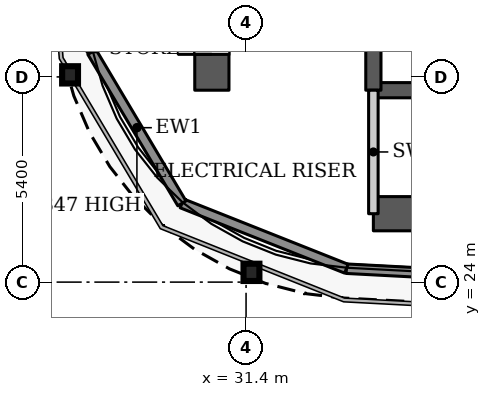
"""IFC4 building model, lengths in metres.
Left out: names, types, materials, properties, quantities, classifications, styles, units other than length and angle.
Written with IfcOpenShell. Run it as: python <this file> out.ifc"""

import sys

from ifc_helpers import new_model, si_unit, direction, frame, frame_2d, origin, origin_2d, place, context, subcontext, project, spatial, rectangle, i_section, extrude, source, transform, mapped, element, fill, save


model = new_model("IFC4")
c1 = context("Model", 3, precision=1e-05, world=origin(), true_north=direction((0.0, 1.0)))
c2 = subcontext(c1, "Body", "Model", "MODEL_VIEW")
j1 = project(units=[si_unit("LENGTHUNIT", "METRE"), si_unit("PLANEANGLEUNIT", "RADIAN")], contexts=[c1])
p1 = place(None, origin())
s1 = spatial("IfcSite", under=j1, at=p1, CompositionType="ELEMENT")
p2 = place(p1, origin())
s2 = spatial("IfcBuilding", under=s1, at=p2, CompositionType="ELEMENT")
p3 = place(p2, frame((0.0, 0.0, 89.0)))
s3 = spatial("IfcBuildingStorey", under=s2, at=p3, CompositionType="ELEMENT", Elevation=89.0)
for number, where, z_axis, x_axis in (
    (1, (31.542, 24.257, 0.0), (0.0, 0.0, 1.0), (1.0, 0.0, 0.0)),
    (2, (26.769, 29.454, 0.0), (0.0, 0.0, 1.0), (1.0, 0.0, 0.0)),
):
    element("IfcColumn", number, at=place(p3, frame(where, z_axis=z_axis, x_axis=x_axis)), inside=s3, PredefinedType="COLUMN", context=c2, shape_type="SweptSolid", body=[
        extrude(i_section(OverallWidth=0.418, OverallDepth=0.455, WebThickness=0.042, FlangeThickness=0.068, FilletRadius=0.014, at=origin_2d()), origin(), (0.0, 0.0, 1.0), 5.1),
    ])
p4 = place(p3, frame((34.75, 25.8, 0.0), z_axis=(0.0, 0.0, 1.0), x_axis=(1.0, 0.0, 0.0)))
e3 = element("IfcWall", 3, at=p4, inside=s3, PredefinedType="SHEAR", context=c2, shape_type="SweptSolid", body=[
    extrude(rectangle(XDim=18.4, YDim=0.9, at=frame_2d((9.2, 0.0))), origin(), (0.0, 0.0, 1.0), 5.1),
])
p5 = place(p3, frame((34.75, 29.05, 0.0), z_axis=(0.0, 0.0, 1.0), x_axis=(1.0, 0.0, 0.0)))
e4 = element("IfcWall", 4, at=p5, inside=s3, PredefinedType="SHEAR", context=c2, shape_type="SweptSolid", body=[
    extrude(rectangle(XDim=18.4, YDim=0.4, at=frame_2d((9.2, 0.0))), origin(), (0.0, 0.0, 1.0), 5.1),
])
p6 = place(p5, frame((15.125, 0.0, 0.0)))
e5 = element("IfcOpeningElement", 5, at=p6, cuts=e4, PredefinedType="OPENING", context=c2, shape_type="SweptSolid", body=[
    extrude(rectangle(XDim=1.1, YDim=2.2, at=frame_2d((0.55, 1.1))), frame((0.0, 0.21, 0.0), z_axis=(0.0, -1.0, 0.0), x_axis=(1.0, 0.0, 0.0)), (0.0, 0.0, 1.0), 0.42),
])
p7 = place(p3, frame((34.75, 29.05, 0.0), z_axis=(0.0, 0.0, 1.0), x_axis=(0.0, 1.0, 0.0)))
e6 = element("IfcWall", 6, at=p7, inside=s3, PredefinedType="SHEAR", context=c2, shape_type="SweptSolid", body=[
    extrude(rectangle(XDim=18.45, YDim=0.4, at=frame_2d((9.225, 0.0))), origin(), (0.0, 0.0, 1.0), 5.1),
])
p8 = place(p7, frame((8.025, 0.0, 0.0)))
e7 = element("IfcOpeningElement", 7, at=p8, cuts=e6, PredefinedType="OPENING", context=c2, shape_type="SweptSolid", body=[
    extrude(rectangle(XDim=1.1, YDim=2.2, at=frame_2d((0.55, 1.1))), frame((0.0, 0.21, 0.0), z_axis=(0.0, -1.0, 0.0), x_axis=(1.0, 0.0, 0.0)), (0.0, 0.0, 1.0), 0.42),
])
p9 = place(p7, frame((10.875, 0.0, 0.0)))
e8 = element("IfcOpeningElement", 8, at=p9, cuts=e6, PredefinedType="OPENING", context=c2, shape_type="SweptSolid", body=[
    extrude(rectangle(XDim=1.1, YDim=2.2, at=frame_2d((0.55, 1.1))), frame((0.0, 0.21, 0.0), z_axis=(0.0, -1.0, 0.0), x_axis=(1.0, 0.0, 0.0)), (0.0, 0.0, 1.0), 0.42),
])
p10 = place(p7, frame((13.725, 0.0, 0.0)))
e9 = element("IfcOpeningElement", 9, at=p10, cuts=e6, PredefinedType="OPENING", context=c2, shape_type="SweptSolid", body=[
    extrude(rectangle(XDim=1.1, YDim=2.2, at=frame_2d((0.55, 1.1))), frame((0.0, 0.21, 0.0), z_axis=(0.0, -1.0, 0.0), x_axis=(1.0, 0.0, 0.0)), (0.0, 0.0, 1.0), 0.42),
])
p11 = place(p7, frame((15.95, 0.0, 0.0)))
e10 = element("IfcOpeningElement", 10, at=p11, cuts=e6, PredefinedType="OPENING", context=c2, shape_type="SweptSolid", body=[
    extrude(rectangle(XDim=1.1, YDim=2.2, at=frame_2d((0.55, 1.1))), frame((0.0, 0.21, 0.0), z_axis=(0.0, -1.0, 0.0), x_axis=(1.0, 0.0, 0.0)), (0.0, 0.0, 1.0), 0.42),
])
p12 = place(p3, frame((30.5, 29.05, 0.0), z_axis=(0.0, 0.0, 1.0), x_axis=(0.0, 1.0, 0.0)))
e11 = element("IfcWall", 11, at=p12, inside=s3, PredefinedType="SHEAR", context=c2, shape_type="SweptSolid", body=[
    extrude(rectangle(XDim=18.45, YDim=0.9, at=frame_2d((9.225, 0.0))), origin(), (0.0, 0.0, 1.0), 5.1),
])
p13 = place(p12, frame((0.944, 0.0, 0.0)))
e12 = element("IfcOpeningElement", 12, at=p13, cuts=e11, PredefinedType="OPENING", context=c2, shape_type="SweptSolid", body=[
    extrude(rectangle(XDim=0.9, YDim=2.2, at=frame_2d((0.45, 1.1))), frame((0.0, 0.46, 0.0), z_axis=(0.0, -1.0, 0.0), x_axis=(1.0, 0.0, 0.0)), (0.0, 0.0, 1.0), 0.92),
])
p14 = place(p12, frame((6.975, 0.0, 0.0)))
e13 = element("IfcOpeningElement", 13, at=p14, cuts=e11, PredefinedType="OPENING", context=c2, shape_type="SweptSolid", body=[
    extrude(rectangle(XDim=0.9, YDim=2.2, at=frame_2d((0.45, 1.1))), frame((0.0, 0.46, 0.0), z_axis=(0.0, -1.0, 0.0), x_axis=(1.0, 0.0, 0.0)), (0.0, 0.0, 1.0), 0.92),
])
p15 = place(p12, frame((11.45, 0.0, 0.0)))
e14 = element("IfcOpeningElement", 14, at=p15, cuts=e11, PredefinedType="OPENING", context=c2, shape_type="SweptSolid", body=[
    extrude(rectangle(XDim=0.9, YDim=2.2, at=frame_2d((0.45, 1.1))), frame((0.0, 0.46, 0.0), z_axis=(0.0, -1.0, 0.0), x_axis=(1.0, 0.0, 0.0)), (0.0, 0.0, 1.0), 0.92),
])
p16 = place(p3, frame((100.625, 20.848, 0.0), z_axis=(0.0, 0.0, 1.0), x_axis=(-0.998617353906, 0.052567865445, 0.0)))
e15 = element("IfcWall", 15, at=p16, inside=s3, PredefinedType="SOLIDWALL", context=c2, shape_type="SweptSolid", body=[
    extrude(rectangle(XDim=66.678, YDim=0.25, at=frame_2d((33.339, 0.0))), origin(), (0.0, 0.0, 1.0), 4.95),
])
p17 = place(p3, frame((34.039, 24.353, 0.0), z_axis=(0.0, 0.0, 1.0), x_axis=(-0.929352825399, 0.369192803184, 0.0)))
e16 = element("IfcWall", 16, at=p17, inside=s3, PredefinedType="SOLIDWALL", context=c2, shape_type="SweptSolid", body=[
    extrude(rectangle(XDim=4.656, YDim=0.25, at=frame_2d((2.328, 0.0))), origin(), (0.0, 0.0, 1.0), 4.95),
])
p18 = place(p3, frame((29.712, 26.072, 0.0), z_axis=(0.0, 0.0, 1.0), x_axis=(-0.511028049012, 0.859564036662, 0.0)))
e17 = element("IfcWall", 17, at=p18, inside=s3, PredefinedType="SOLIDWALL", context=c2, shape_type="SweptSolid", body=[
    extrude(rectangle(XDim=4.634, YDim=0.25, at=frame_2d((2.317, 0.0))), origin(), (0.0, 0.0, 1.0), 4.347),
])
p19 = place(p3, frame((27.344, 30.055, 0.0), z_axis=(0.0, 0.0, 1.0), x_axis=(-0.077571675317, 0.99698677784, 0.0)))
e18 = element("IfcWall", 18, at=p19, inside=s3, PredefinedType="SOLIDWALL", context=c2, shape_type="SweptSolid", body=[
    extrude(rectangle(XDim=1.92, YDim=0.25, at=frame_2d((0.96, 0.0))), origin(), (0.0, 0.0, 1.0), 4.95),
])
p20 = place(p3, frame((34.75, 25.8, 0.0), z_axis=(0.0, 0.0, 1.0), x_axis=(0.0, 1.0, 0.0)))
e19 = element("IfcWall", 19, at=p20, inside=s3, PredefinedType="PARTITIONING", context=c2, shape_type="SweptSolid", body=[
    extrude(rectangle(XDim=3.25, YDim=0.25, at=frame_2d((1.625, 0.0))), origin(), (0.0, 0.0, 1.0), 5.1),
])
m1 = source(origin(), c2, "Body", "SweptSolid", [
    extrude(rectangle(XDim=0.9, YDim=2.2, at=frame_2d((0.45, 1.1))), frame((0.0, 0.025, 0.0), z_axis=(0.0, -1.0, 0.0), x_axis=(1.0, 0.0, 0.0)), (0.0, 0.0, 1.0), 0.05),
])
p21 = place(p13, origin())
e20 = element("IfcDoor", 20, at=p21, inside=s3, OperationType="SINGLE_SWING_LEFT", PredefinedType="DOOR", context=c2, shape_type="MappedRepresentation", body=[
    mapped(m1, transform((0.0, 0.0, 0.0), x_axis=(1.0, 0.0, 0.0), y_axis=(0.0, 1.0, 0.0), z_axis=(0.0, 0.0, 1.0), scale=1.0)),
])
fill(e12, e20)
save(model, sys.argv[1])
